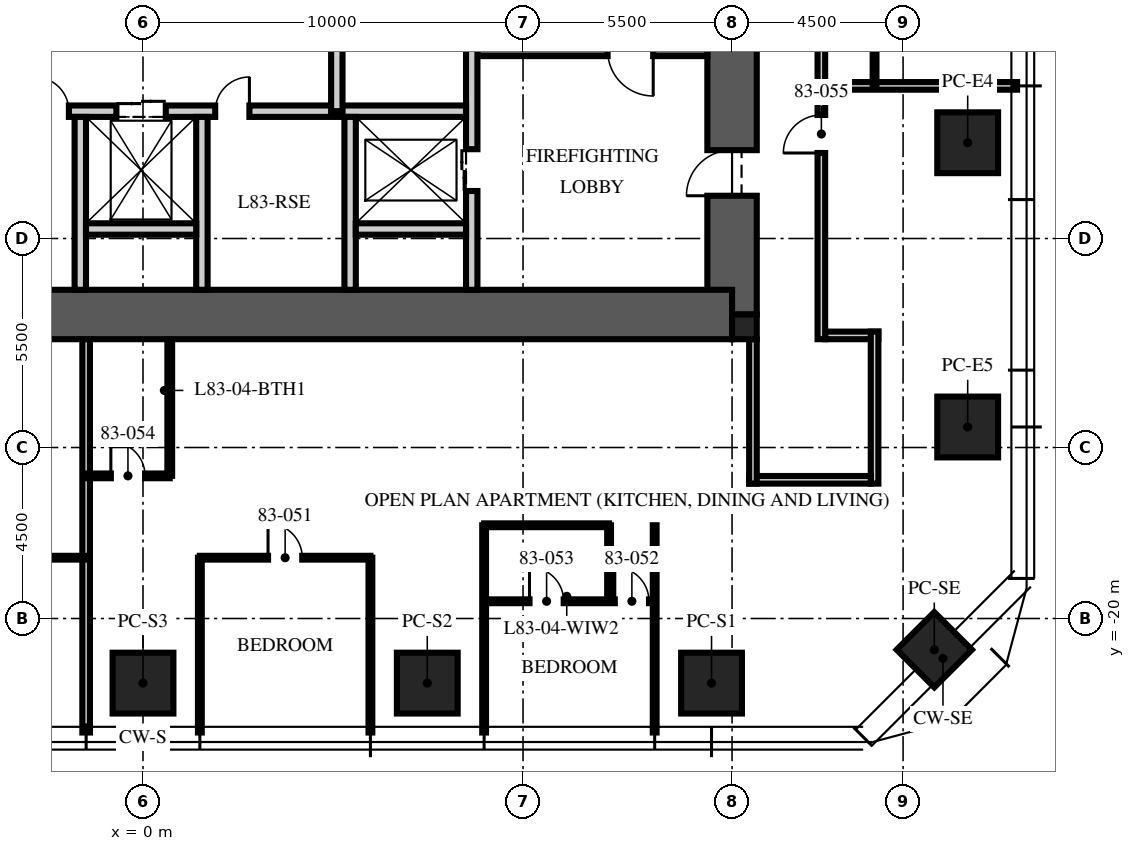
"""IFC4 building model, lengths in metres.
Left out: names, types, materials, properties, quantities, classifications, styles, units other than length and angle.
Written with IfcOpenShell. Run it as: python <this file> out.ifc"""

import sys

from ifc_helpers import new_model, si_unit, direction, frame, frame_2d, origin, origin_2d, place, context, subcontext, project, spatial, rectangle, extrude, element, fill, save


model = new_model("IFC4")
c1 = context("Model", 3, precision=1e-05, world=origin(), true_north=direction((0.0, 1.0)))
c2 = subcontext(c1, "Body", "Model", "MODEL_VIEW")
j1 = project(units=[si_unit("LENGTHUNIT", "METRE"), si_unit("PLANEANGLEUNIT", "RADIAN")], contexts=[c1])
p1 = place(None, origin())
s1 = spatial("IfcSite", under=j1, at=p1, CompositionType="ELEMENT")
p2 = place(p1, origin())
s2 = spatial("IfcBuilding", under=s1, at=p2, CompositionType="ELEMENT")
p3 = place(p2, frame((0.0, 0.0, 330.75)))
s3 = spatial("IfcBuildingStorey", under=s2, at=p3, CompositionType="ELEMENT", Elevation=330.75)
p4 = place(p3, frame((15.5, -12.0, -0.25), z_axis=(0.0, 0.0, 1.0), x_axis=(0.0, 1.0, 0.0)))
e1 = element("IfcWall", 1, at=p4, inside=s3, PredefinedType="SHEAR", context=c2, shape_type="SweptSolid", body=[
    extrude(rectangle(XDim=24.0, YDim=1.3, at=frame_2d((12.0, 0.0))), origin(), (0.0, 0.0, 1.0), 3.75),
])
p5 = place(p4, frame((3.125, 0.0, 0.25)))
e2 = element("IfcOpeningElement", 2, at=p5, cuts=e1, PredefinedType="OPENING", context=c2, shape_type="SweptSolid", body=[
    extrude(rectangle(XDim=1.2, YDim=2.1, at=frame_2d((0.6, 1.05))), frame((0.0, 0.66, 0.0), z_axis=(0.0, -1.0, 0.0), x_axis=(1.0, 0.0, 0.0)), (0.0, 0.0, 1.0), 1.32),
])
p6 = place(p4, frame((19.375, 0.0, 0.25)))
e3 = element("IfcOpeningElement", 3, at=p6, cuts=e1, PredefinedType="OPENING", context=c2, shape_type="SweptSolid", body=[
    extrude(rectangle(XDim=1.8, YDim=2.1, at=frame_2d((0.9, 1.05))), frame((0.0, 0.66, 0.0), z_axis=(0.0, -1.0, 0.0), x_axis=(1.0, 0.0, 0.0)), (0.0, 0.0, 1.0), 1.32),
])
p7 = place(p3, frame((-15.5, -12.0, -0.25), z_axis=(0.0, 0.0, 1.0), x_axis=(1.0, 0.0, 0.0)))
e4 = element("IfcWall", 4, at=p7, inside=s3, PredefinedType="SHEAR", context=c2, shape_type="SweptSolid", body=[
    extrude(rectangle(XDim=31.0, YDim=1.3, at=frame_2d((15.5, 0.0))), origin(), (0.0, 0.0, 1.0), 3.75),
])
p8 = place(p3, frame((15.825, -12.325, -0.25), z_axis=(0.0, 0.0, 1.0), x_axis=(1.0, 0.0, 0.0)))
e5 = element("IfcColumn", 5, at=p8, inside=s3, PredefinedType="COLUMN", context=c2, shape_type="SweptSolid", body=[
    extrude(rectangle(XDim=0.65, YDim=0.65, at=origin_2d()), origin(), (0.0, 0.0, 1.0), 3.75),
])
for number, where, z_axis, x_axis in (
    (6, (21.7, -7.48, 0.0), (0.0, 0.0, 1.0), (0.0, 1.0, 0.0)),
    (7, (21.7, -14.96, 0.0), (0.0, 0.0, 1.0), (0.0, 1.0, 0.0)),
    (8, (14.96, -21.7, 0.0), (0.0, 0.0, 1.0), (1.0, 0.0, 0.0)),
    (9, (7.48, -21.7, 0.0), (0.0, 0.0, 1.0), (1.0, 0.0, 0.0)),
    (10, (0.0, -21.7, 0.0), (0.0, 0.0, 1.0), (1.0, 0.0, 0.0)),
):
    element("IfcColumn", number, at=place(p3, frame(where, z_axis=z_axis, x_axis=x_axis)), inside=s3, PredefinedType="COLUMN", context=c2, shape_type="SweptSolid", body=[
        extrude(rectangle(XDim=1.6, YDim=1.6, at=origin_2d()), origin(), (0.0, 0.0, 1.0), 3.75),
    ])
p9 = place(p3, frame((20.821, -20.821, 0.0), z_axis=(0.0, 0.0, 1.0), x_axis=(0.707106781187, 0.707106781187, 0.0)))
e11 = element("IfcColumn", 11, at=p9, inside=s3, PredefinedType="COLUMN", context=c2, shape_type="SweptSolid", body=[
    extrude(rectangle(XDim=1.4, YDim=1.4, at=origin_2d()), origin(), (0.0, 0.0, 1.0), 3.75),
])
p10 = place(p3, frame((14.85, -5.05, 0.0), z_axis=(0.0, 0.0, 1.0), x_axis=(-1.0, 0.0, 0.0)))
e12 = element("IfcWall", 12, at=p10, inside=s3, PredefinedType="SOLIDWALL", context=c2, shape_type="SweptSolid", body=[
    extrude(rectangle(XDim=6.05, YDim=0.3, at=frame_2d((3.025, 0.0))), origin(), (0.0, 0.0, 1.0), 3.5),
])
p11 = place(p10, frame((1.425, 0.0, 0.0)))
e13 = element("IfcOpeningElement", 13, at=p11, cuts=e12, PredefinedType="OPENING", context=c2, shape_type="SweptSolid", body=[
    extrude(rectangle(XDim=1.2, YDim=2.1, at=frame_2d((0.6, 1.05))), frame((0.0, 0.16, 0.0), z_axis=(0.0, -1.0, 0.0), x_axis=(1.0, 0.0, 0.0)), (0.0, 0.0, 1.0), 0.32),
])
p12 = place(p3, frame((8.65, -11.35, 0.0), z_axis=(0.0, 0.0, 1.0), x_axis=(0.0, 1.0, 0.0)))
e14 = element("IfcWall", 14, at=p12, inside=s3, PredefinedType="PARTITIONING", context=c2, shape_type="SweptSolid", body=[
    extrude(rectangle(XDim=6.45, YDim=0.3, at=frame_2d((3.225, 0.0))), origin(), (0.0, 0.0, 1.0), 3.5),
])
p13 = place(p12, frame((2.6, 0.0, 0.0)))
e15 = element("IfcOpeningElement", 15, at=p13, cuts=e14, PredefinedType="OPENING", context=c2, shape_type="SweptSolid", body=[
    extrude(rectangle(XDim=1.1, YDim=2.1, at=frame_2d((0.55, 1.05))), frame((0.0, 0.16, 0.0), z_axis=(0.0, -1.0, 0.0), x_axis=(1.0, 0.0, 0.0)), (0.0, 0.0, 1.0), 0.32),
])
p14 = place(p3, frame((-8.5, -6.65, 0.0), z_axis=(0.0, 0.0, 1.0), x_axis=(1.0, 0.0, 0.0)))
e16 = element("IfcWall", 16, at=p14, inside=s3, PredefinedType="PARTITIONING", context=c2, shape_type="SweptSolid", body=[
    extrude(rectangle(XDim=17.0, YDim=0.3, at=frame_2d((8.5, 0.0))), origin(), (0.0, 0.0, 1.0), 3.5),
])
p15 = place(p14, frame((7.8, 0.0, 0.0)))
e17 = element("IfcOpeningElement", 17, at=p15, cuts=e16, PredefinedType="OPENING", context=c2, shape_type="SweptSolid", body=[
    extrude(rectangle(XDim=1.3, YDim=2.4, at=frame_2d((0.65, 1.2))), frame((0.0, 0.16, 0.0), z_axis=(0.0, -1.0, 0.0), x_axis=(1.0, 0.0, 0.0)), (0.0, 0.0, 1.0), 0.32),
])
p16 = place(p14, frame((5.65, 0.0, 0.0)))
e18 = element("IfcOpeningElement", 18, at=p16, cuts=e16, PredefinedType="OPENING", context=c2, shape_type="SweptSolid", body=[
    extrude(rectangle(XDim=0.9, YDim=2.1, at=frame_2d((0.45, 1.05))), frame((0.0, 0.16, 0.0), z_axis=(0.0, -1.0, 0.0), x_axis=(1.0, 0.0, 0.0)), (0.0, 0.0, 1.0), 0.32),
])
p17 = place(p14, frame((10.4, 0.0, 0.0)))
e19 = element("IfcOpeningElement", 19, at=p17, cuts=e16, PredefinedType="OPENING", context=c2, shape_type="SweptSolid", body=[
    extrude(rectangle(XDim=0.9, YDim=2.1, at=frame_2d((0.45, 1.05))), frame((0.0, 0.16, 0.0), z_axis=(0.0, -1.0, 0.0), x_axis=(1.0, 0.0, 0.0)), (0.0, 0.0, 1.0), 0.32),
])
for number, where, z_axis, x_axis in (
    (20, (-1.65, -11.35, 0.0), (0.0, 0.0, 1.0), (0.0, 1.0, 0.0)),
    (21, (1.55, -11.35, 0.0), (0.0, 0.0, 1.0), (0.0, 1.0, 0.0)),
    (22, (5.45, -11.35, 0.0), (0.0, 0.0, 1.0), (0.0, 1.0, 0.0)),
):
    element("IfcWall", number, at=place(p3, frame(where, z_axis=z_axis, x_axis=x_axis)), inside=s3, PredefinedType="PARTITIONING", context=c2, shape_type="SweptSolid", body=[
        extrude(rectangle(XDim=4.55, YDim=0.3, at=frame_2d((2.275, 0.0))), origin(), (0.0, 0.0, 1.0), 3.5),
    ])
for number, where, z_axis, x_axis in (
    (23, (-1.5, -9.75, 0.0), (0.0, 0.0, 1.0), (1.0, 0.0, 0.0)),
    (24, (5.6, -9.75, 0.0), (0.0, 0.0, 1.0), (1.0, 0.0, 0.0)),
):
    element("IfcWall", number, at=place(p3, frame(where, z_axis=z_axis, x_axis=x_axis)), inside=s3, PredefinedType="PARTITIONING", context=c2, shape_type="SweptSolid", body=[
        extrude(rectangle(XDim=2.9, YDim=0.3, at=frame_2d((1.45, 0.0))), origin(), (0.0, 0.0, 1.0), 3.5),
    ])
p18 = place(p3, frame((5.1, -6.65, 0.0), z_axis=(0.0, 0.0, 1.0), x_axis=(0.0, 1.0, 0.0)))
e25 = element("IfcWall", 25, at=p18, inside=s3, PredefinedType="PARTITIONING", context=c2, shape_type="SweptSolid", body=[
    extrude(rectangle(XDim=8.45, YDim=0.3, at=frame_2d((4.225, 0.0))), origin(), (0.0, 0.0, 1.0), 3.5),
])
p19 = place(p18, frame((1.866, 0.0, 0.0)))
e26 = element("IfcOpeningElement", 26, at=p19, cuts=e25, PredefinedType="OPENING", context=c2, shape_type="SweptSolid", body=[
    extrude(rectangle(XDim=0.9, YDim=2.1, at=frame_2d((0.45, 1.05))), frame((0.0, 0.16, 0.0), z_axis=(0.0, -1.0, 0.0), x_axis=(1.0, 0.0, 0.0)), (0.0, 0.0, 1.0), 0.32),
])
p20 = place(p18, frame((6.091, 0.0, 0.0)))
e27 = element("IfcOpeningElement", 27, at=p20, cuts=e25, PredefinedType="OPENING", context=c2, shape_type="SweptSolid", body=[
    extrude(rectangle(XDim=0.9, YDim=2.1, at=frame_2d((0.45, 1.05))), frame((0.0, 0.16, 0.0), z_axis=(0.0, -1.0, 0.0), x_axis=(1.0, 0.0, 0.0)), (0.0, 0.0, 1.0), 0.32),
])
p21 = place(p3, frame((17.95, -12.55, 0.0), z_axis=(0.0, 0.0, 1.0), x_axis=(1.0, 0.0, 0.0)))
e28 = element("IfcWall", 28, at=p21, inside=s3, PredefinedType="PARTITIONING", context=c2, shape_type="SweptSolid", body=[
    extrude(rectangle(XDim=1.4, YDim=0.2, at=frame_2d((0.7, 0.0))), origin(), (0.0, 0.0, 1.0), 3.5),
])
p22 = place(p3, frame((19.25, -12.45, 0.0), z_axis=(0.0, 0.0, 1.0), x_axis=(0.0, -1.0, 0.0)))
e29 = element("IfcWall", 29, at=p22, inside=s3, PredefinedType="PARTITIONING", context=c2, shape_type="SweptSolid", body=[
    extrude(rectangle(XDim=4.0, YDim=0.2, at=frame_2d((2.0, 0.0))), origin(), (0.0, 0.0, 1.0), 2.9),
])
p23 = place(p3, frame((19.15, -16.35, 0.0), z_axis=(0.0, 0.0, 1.0), x_axis=(-1.0, 0.0, 0.0)))
e30 = element("IfcWall", 30, at=p23, inside=s3, PredefinedType="PARTITIONING", context=c2, shape_type="SweptSolid", body=[
    extrude(rectangle(XDim=3.2, YDim=0.2, at=frame_2d((1.6, 0.0))), origin(), (0.0, 0.0, 1.0), 2.6),
])
p24 = place(p3, frame((16.05, -16.45, 0.0), z_axis=(0.0, 0.0, 1.0), x_axis=(0.0, 1.0, 0.0)))
e31 = element("IfcWall", 31, at=p24, inside=s3, PredefinedType="PARTITIONING", context=c2, shape_type="SweptSolid", body=[
    extrude(rectangle(XDim=3.8, YDim=0.2, at=frame_2d((1.9, 0.0))), origin(), (0.0, 0.0, 1.0), 2.6),
])
p25 = place(p3, frame((17.95, -5.984, 0.0), z_axis=(0.0, 0.0, 1.0), x_axis=(1.0, 0.0, 0.0)))
e32 = element("IfcWall", 32, at=p25, inside=s3, PredefinedType="PARTITIONING", context=c2, shape_type="SweptSolid", body=[
    extrude(rectangle(XDim=5.05, YDim=0.2, at=frame_2d((2.525, 0.0))), origin(), (0.0, 0.0, 1.0), 3.01),
])
p26 = place(p3, frame((-1.496, -12.65, 0.0), z_axis=(0.0, 0.0, 1.0), x_axis=(0.0, -1.0, 0.0)))
e33 = element("IfcWall", 33, at=p26, inside=s3, PredefinedType="PARTITIONING", context=c2, shape_type="SweptSolid", body=[
    extrude(rectangle(XDim=10.35, YDim=0.2, at=frame_2d((5.175, 0.0))), origin(), (0.0, 0.0, 1.0), 3.01),
])
for number, where, z_axis, x_axis in (
    (34, (1.496, -18.4, 0.0), (0.0, 0.0, 1.0), (0.0, -1.0, 0.0)),
    (35, (5.984, -18.4, 0.0), (0.0, 0.0, 1.0), (0.0, -1.0, 0.0)),
):
    element("IfcWall", number, at=place(p3, frame(where, z_axis=z_axis, x_axis=x_axis)), inside=s3, PredefinedType="PARTITIONING", context=c2, shape_type="SweptSolid", body=[
        extrude(rectangle(XDim=4.6, YDim=0.1, at=frame_2d((2.3, 0.0))), origin(), (0.0, 0.0, 1.0), 3.01),
    ])
for number, where, z_axis, x_axis in (
    (36, (8.976, -17.546, 0.0), (0.0, 0.0, 1.0), (0.0, -1.0, 0.0)),
    (37, (13.464, -17.546, 0.0), (0.0, 0.0, 1.0), (0.0, -1.0, 0.0)),
):
    element("IfcWall", number, at=place(p3, frame(where, z_axis=z_axis, x_axis=x_axis)), inside=s3, PredefinedType="PARTITIONING", context=c2, shape_type="SweptSolid", body=[
        extrude(rectangle(XDim=5.454, YDim=0.1, at=frame_2d((2.727, 0.0))), origin(), (0.0, 0.0, 1.0), 3.01),
    ])
p27 = place(p3, frame((19.25, -5.984, 0.0), z_axis=(0.0, 0.0, 1.0), x_axis=(0.0, 1.0, 0.0)))
e38 = element("IfcWall", 38, at=p27, inside=s3, PredefinedType="PARTITIONING", context=c2, shape_type="SweptSolid", body=[
    extrude(rectangle(XDim=4.488, YDim=0.1, at=frame_2d((2.244, 0.0))), origin(), (0.0, 0.0, 1.0), 2.91),
])
p28 = place(p27, frame((1.794, 0.0, 0.0)))
e39 = element("IfcOpeningElement", 39, at=p28, cuts=e38, PredefinedType="OPENING", context=c2, shape_type="SweptSolid", body=[
    extrude(rectangle(XDim=0.9, YDim=2.1, at=frame_2d((0.45, 1.05))), frame((0.0, 0.06, 0.0), z_axis=(0.0, -1.0, 0.0), x_axis=(1.0, 0.0, 0.0)), (0.0, 0.0, 1.0), 0.12),
])
p29 = place(p3, frame((-5.984, -18.4, 0.0), z_axis=(0.0, 0.0, 1.0), x_axis=(1.0, 0.0, 0.0)))
e40 = element("IfcWall", 40, at=p29, inside=s3, PredefinedType="PARTITIONING", context=c2, shape_type="SweptSolid", body=[
    extrude(rectangle(XDim=4.488, YDim=0.1, at=frame_2d((2.244, 0.0))), origin(), (0.0, 0.0, 1.0), 2.91),
])
p30 = place(p29, frame((1.794, 0.0, 0.0)))
e41 = element("IfcOpeningElement", 41, at=p30, cuts=e40, PredefinedType="OPENING", context=c2, shape_type="SweptSolid", body=[
    extrude(rectangle(XDim=0.9, YDim=2.1, at=frame_2d((0.45, 1.05))), frame((0.0, 0.06, 0.0), z_axis=(0.0, -1.0, 0.0), x_axis=(1.0, 0.0, 0.0)), (0.0, 0.0, 1.0), 0.12),
])
p31 = place(p3, frame((1.496, -18.4, 0.0), z_axis=(0.0, 0.0, 1.0), x_axis=(1.0, 0.0, 0.0)))
e42 = element("IfcWall", 42, at=p31, inside=s3, PredefinedType="PARTITIONING", context=c2, shape_type="SweptSolid", body=[
    extrude(rectangle(XDim=4.488, YDim=0.1, at=frame_2d((2.244, 0.0))), origin(), (0.0, 0.0, 1.0), 2.91),
])
p32 = place(p31, frame((1.794, 0.0, 0.0)))
e43 = element("IfcOpeningElement", 43, at=p32, cuts=e42, PredefinedType="OPENING", context=c2, shape_type="SweptSolid", body=[
    extrude(rectangle(XDim=0.9, YDim=2.1, at=frame_2d((0.45, 1.05))), frame((0.0, 0.06, 0.0), z_axis=(0.0, -1.0, 0.0), x_axis=(1.0, 0.0, 0.0)), (0.0, 0.0, 1.0), 0.12),
])
p33 = place(p3, frame((8.976, -19.546, 0.0), z_axis=(0.0, 0.0, 1.0), x_axis=(1.0, 0.0, 0.0)))
e44 = element("IfcWall", 44, at=p33, inside=s3, PredefinedType="PARTITIONING", context=c2, shape_type="SweptSolid", body=[
    extrude(rectangle(XDim=4.488, YDim=0.1, at=frame_2d((2.244, 0.0))), origin(), (0.0, 0.0, 1.0), 2.91),
])
p34 = place(p33, frame((3.438, 0.0, 0.0)))
e45 = element("IfcOpeningElement", 45, at=p34, cuts=e44, PredefinedType="OPENING", context=c2, shape_type="SweptSolid", body=[
    extrude(rectangle(XDim=0.9, YDim=2.1, at=frame_2d((0.45, 1.05))), frame((0.0, 0.06, 0.0), z_axis=(0.0, -1.0, 0.0), x_axis=(1.0, 0.0, 0.0)), (0.0, 0.0, 1.0), 0.12),
])
p35 = place(p33, frame((1.194, 0.0, 0.0)))
e46 = element("IfcOpeningElement", 46, at=p35, cuts=e44, PredefinedType="OPENING", context=c2, shape_type="SweptSolid", body=[
    extrude(rectangle(XDim=0.9, YDim=2.1, at=frame_2d((0.45, 1.05))), frame((0.0, 0.06, 0.0), z_axis=(0.0, -1.0, 0.0), x_axis=(1.0, 0.0, 0.0)), (0.0, 0.0, 1.0), 0.12),
])
p36 = place(p3, frame((12.264, -17.546, 0.0), z_axis=(0.0, 0.0, 1.0), x_axis=(0.0, -1.0, 0.0)))
e47 = element("IfcWall", 47, at=p36, inside=s3, PredefinedType="PARTITIONING", context=c2, shape_type="SweptSolid", body=[
    extrude(rectangle(XDim=2.0, YDim=0.1, at=frame_2d((1.0, 0.0))), origin(), (0.0, 0.0, 1.0), 3.5),
])
p37 = place(p3, frame((8.976, -17.546, 0.0), z_axis=(0.0, 0.0, 1.0), x_axis=(1.0, 0.0, 0.0)))
e48 = element("IfcWall", 48, at=p37, inside=s3, PredefinedType="PARTITIONING", context=c2, shape_type="SweptSolid", body=[
    extrude(rectangle(XDim=3.288, YDim=0.1, at=frame_2d((1.644, 0.0))), origin(), (0.0, 0.0, 1.0), 2.91),
])
p38 = place(p3, frame((-1.496, -16.246, 0.0), z_axis=(0.0, 0.0, 1.0), x_axis=(1.0, 0.0, 0.0)))
e49 = element("IfcWall", 49, at=p38, inside=s3, PredefinedType="PARTITIONING", context=c2, shape_type="SweptSolid", body=[
    extrude(rectangle(XDim=2.2, YDim=0.125, at=frame_2d((1.1, 0.0))), origin(), (0.0, 0.0, 1.0), 2.9),
])
p39 = place(p38, frame((0.65, 0.0, 0.0)))
e50 = element("IfcOpeningElement", 50, at=p39, cuts=e49, PredefinedType="OPENING", context=c2, shape_type="SweptSolid", body=[
    extrude(rectangle(XDim=0.9, YDim=2.1, at=frame_2d((0.45, 1.05))), frame((0.0, 0.073, 0.0), z_axis=(0.0, -1.0, 0.0), x_axis=(1.0, 0.0, 0.0)), (0.0, 0.0, 1.0), 0.145),
])
p40 = place(p3, frame((0.704, -12.65, 0.0), z_axis=(0.0, 0.0, 1.0), x_axis=(0.0, -1.0, 0.0)))
e51 = element("IfcWall", 51, at=p40, inside=s3, PredefinedType="PARTITIONING", context=c2, shape_type="SweptSolid", body=[
    extrude(rectangle(XDim=3.596, YDim=0.125, at=frame_2d((1.798, 0.0))), origin(), (0.0, 0.0, 1.0), 3.5),
])
p41 = place(p3, frame((17.85, -12.65, 0.0), z_axis=(0.0, 0.0, 1.0), x_axis=(0.0, 1.0, 0.0)))
e52 = element("IfcWall", 52, at=p41, inside=s3, PredefinedType="PARTITIONING", context=c2, shape_type="SweptSolid", body=[
    extrude(rectangle(XDim=25.5, YDim=0.2, at=frame_2d((12.75, 0.0))), origin(), (0.0, 0.0, 1.0), 2.9),
])
p42 = place(p41, frame((23.186, 0.0, 0.0)))
e53 = element("IfcOpeningElement", 53, at=p42, cuts=e52, PredefinedType="OPENING", context=c2, shape_type="SweptSolid", body=[
    extrude(rectangle(XDim=1.0, YDim=2.2, at=frame_2d((0.5, 1.1))), frame((0.0, 0.11, 0.0), z_axis=(0.0, -1.0, 0.0), x_axis=(1.0, 0.0, 0.0)), (0.0, 0.0, 1.0), 0.22),
])
p43 = place(p41, frame((4.9, 0.0, 0.0)))
e54 = element("IfcOpeningElement", 54, at=p43, cuts=e52, PredefinedType="OPENING", context=c2, shape_type="SweptSolid", body=[
    extrude(rectangle(XDim=1.0, YDim=2.2, at=frame_2d((0.5, 1.1))), frame((0.0, 0.11, 0.0), z_axis=(0.0, -1.0, 0.0), x_axis=(1.0, 0.0, 0.0)), (0.0, 0.0, 1.0), 0.22),
])
p44 = place(p5, origin())
e55 = element("IfcDoor", 55, at=p44, inside=s3, OperationType="SINGLE_SWING_LEFT", PredefinedType="DOOR", context=c2, shape_type="SweptSolid", body=[
    extrude(rectangle(XDim=1.2, YDim=2.1, at=frame_2d((0.6, 1.05))), frame((0.0, 0.025, 0.0), z_axis=(0.0, -1.0, 0.0), x_axis=(1.0, 0.0, 0.0)), (0.0, 0.0, 1.0), 0.05),
])
fill(e2, e55)
p45 = place(p13, origin())
e56 = element("IfcDoor", 56, at=p45, inside=s3, OperationType="DOUBLE_DOOR_SLIDING", PredefinedType="DOOR", context=c2, shape_type="SweptSolid", body=[
    extrude(rectangle(XDim=1.1, YDim=2.1, at=frame_2d((0.55, 1.05))), frame((0.0, 0.025, 0.0), z_axis=(0.0, -1.0, 0.0), x_axis=(1.0, 0.0, 0.0)), (0.0, 0.0, 1.0), 0.05),
])
fill(e15, e56)
p46 = place(p15, origin())
e57 = element("IfcDoor", 57, at=p46, inside=s3, OperationType="DOUBLE_DOOR_SLIDING", PredefinedType="DOOR", context=c2, shape_type="SweptSolid", body=[
    extrude(rectangle(XDim=1.3, YDim=2.4, at=frame_2d((0.65, 1.2))), frame((0.0, 0.025, 0.0), z_axis=(0.0, -1.0, 0.0), x_axis=(1.0, 0.0, 0.0)), (0.0, 0.0, 1.0), 0.05),
])
fill(e17, e57)
p47 = place(p16, origin())
e58 = element("IfcDoor", 58, at=p47, inside=s3, OperationType="SINGLE_SWING_LEFT", PredefinedType="DOOR", context=c2, shape_type="SweptSolid", body=[
    extrude(rectangle(XDim=0.9, YDim=2.1, at=frame_2d((0.45, 1.05))), frame((0.0, 0.025, 0.0), z_axis=(0.0, -1.0, 0.0), x_axis=(1.0, 0.0, 0.0)), (0.0, 0.0, 1.0), 0.05),
])
fill(e18, e58)
p48 = place(p17, origin())
e59 = element("IfcDoor", 59, at=p48, inside=s3, OperationType="SINGLE_SWING_RIGHT", PredefinedType="DOOR", context=c2, shape_type="SweptSolid", body=[
    extrude(rectangle(XDim=0.9, YDim=2.1, at=frame_2d((0.45, 1.05))), frame((0.0, 0.025, 0.0), z_axis=(0.0, -1.0, 0.0), x_axis=(1.0, 0.0, 0.0)), (0.0, 0.0, 1.0), 0.05),
])
fill(e19, e59)
p49 = place(p32, origin())
e60 = element("IfcDoor", 60, at=p49, inside=s3, OperationType="SINGLE_SWING_LEFT", PredefinedType="DOOR", context=c2, shape_type="SweptSolid", body=[
    extrude(rectangle(XDim=0.9, YDim=2.1, at=frame_2d((0.45, 1.05))), frame((0.0, 0.025, 0.0), z_axis=(0.0, -1.0, 0.0), x_axis=(1.0, 0.0, 0.0)), (0.0, 0.0, 1.0), 0.05),
])
fill(e43, e60)
p50 = place(p34, origin())
e61 = element("IfcDoor", 61, at=p50, inside=s3, OperationType="SINGLE_SWING_LEFT", PredefinedType="DOOR", context=c2, shape_type="SweptSolid", body=[
    extrude(rectangle(XDim=0.9, YDim=2.1, at=frame_2d((0.45, 1.05))), frame((0.0, 0.025, 0.0), z_axis=(0.0, -1.0, 0.0), x_axis=(1.0, 0.0, 0.0)), (0.0, 0.0, 1.0), 0.05),
])
fill(e45, e61)
p51 = place(p35, origin())
e62 = element("IfcDoor", 62, at=p51, inside=s3, OperationType="SINGLE_SWING_LEFT", PredefinedType="DOOR", context=c2, shape_type="SweptSolid", body=[
    extrude(rectangle(XDim=0.9, YDim=2.1, at=frame_2d((0.45, 1.05))), frame((0.0, 0.025, 0.0), z_axis=(0.0, -1.0, 0.0), x_axis=(1.0, 0.0, 0.0)), (0.0, 0.0, 1.0), 0.05),
])
fill(e46, e62)
p52 = place(p39, origin())
e63 = element("IfcDoor", 63, at=p52, inside=s3, OperationType="SINGLE_SWING_LEFT", PredefinedType="DOOR", context=c2, shape_type="SweptSolid", body=[
    extrude(rectangle(XDim=0.9, YDim=2.1, at=frame_2d((0.45, 1.05))), frame((0.0, 0.025, 0.0), z_axis=(0.0, -1.0, 0.0), x_axis=(1.0, 0.0, 0.0)), (0.0, 0.0, 1.0), 0.05),
])
fill(e50, e63)
p53 = place(p43, origin())
e64 = element("IfcDoor", 64, at=p53, inside=s3, OperationType="SINGLE_SWING_LEFT", PredefinedType="DOOR", context=c2, shape_type="SweptSolid", body=[
    extrude(rectangle(XDim=1.0, YDim=2.2, at=frame_2d((0.5, 1.1))), frame((0.0, 0.025, 0.0), z_axis=(0.0, -1.0, 0.0), x_axis=(1.0, 0.0, 0.0)), (0.0, 0.0, 1.0), 0.05),
])
fill(e54, e64)
save(model, sys.argv[1])
